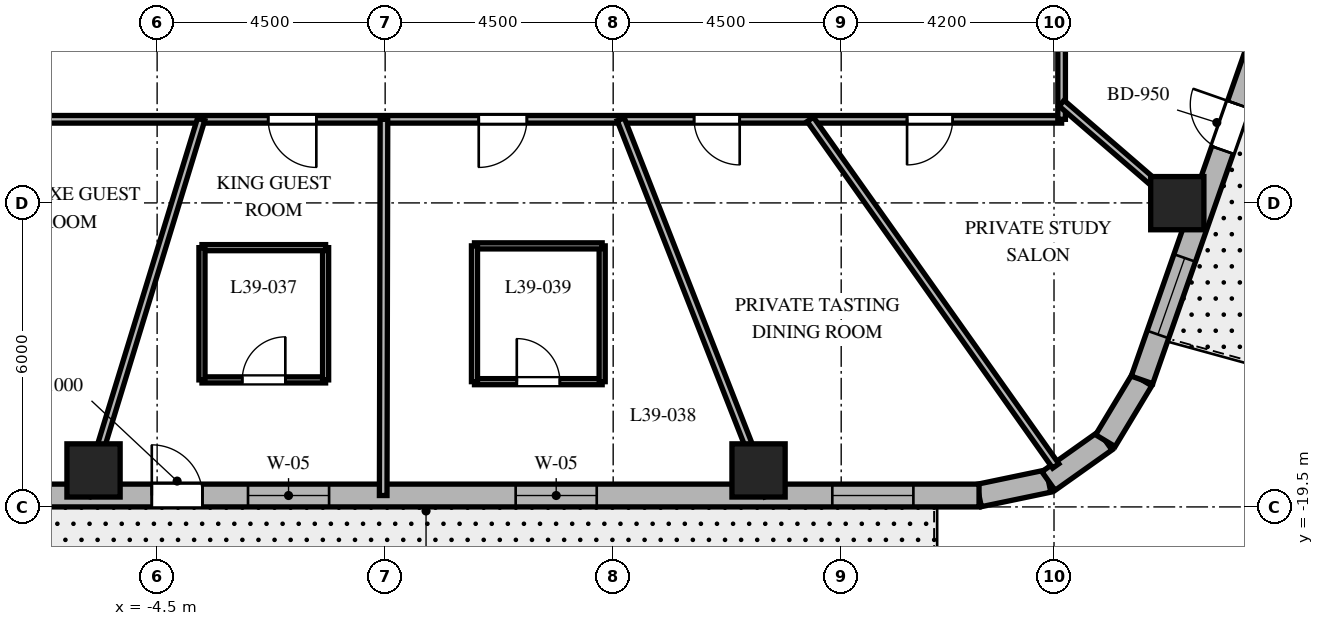
"""IFC4 building model, lengths in metres.
Left out: names, types, materials, properties, quantities, classifications, styles, units other than length and angle.
Written with IfcOpenShell. Run it as: python <this file> out.ifc"""

import sys

from ifc_helpers import new_model, si_unit, direction, frame, frame_2d, origin, origin_2d, place, context, subcontext, project, spatial, rectangle, extrude, element, fill, save


model = new_model("IFC4")
c1 = context("Model", 3, precision=1e-05, world=origin(), true_north=direction((0.0, 1.0)))
c2 = subcontext(c1, "Body", "Model", "MODEL_VIEW")
j1 = project(units=[si_unit("LENGTHUNIT", "METRE"), si_unit("PLANEANGLEUNIT", "RADIAN")], contexts=[c1])
p1 = place(None, origin())
s1 = spatial("IfcSite", under=j1, at=p1, CompositionType="ELEMENT")
p2 = place(p1, origin())
s2 = spatial("IfcBuilding", under=s1, at=p2, CompositionType="ELEMENT")
p3 = place(p2, frame((0.0, 0.0, 159.1)))
s3 = spatial("IfcBuildingStorey", under=s2, at=p3, CompositionType="ELEMENT", Elevation=159.1)
for number, where, z_axis, x_axis in (
    (1, (-5.755, -18.78, 0.0), (0.0, 0.0, 1.0), (1.0, 0.0, 0.0)),
    (2, (7.369, -18.78, 0.0), (0.0, 0.0, 1.0), (1.0, 0.0, 0.0)),
    (3, (15.633, -13.505, 0.0), (0.0, 0.0, 1.0), (1.0, 0.0, 0.0)),
):
    element("IfcColumn", number, at=place(p3, frame(where, z_axis=z_axis, x_axis=x_axis)), inside=s3, PredefinedType="COLUMN", context=c2, shape_type="SweptSolid", body=[
        extrude(rectangle(XDim=1.05, YDim=1.05, at=origin_2d()), origin(), (0.0, 0.0, 1.0), 3.7),
    ])
p4 = place(p3, frame((11.72, -19.275, 0.0), z_axis=(0.0, 0.0, 1.0), x_axis=(0.97893106758, 0.204191001093, 0.0)))
e4 = element("IfcWall", 4, at=p4, inside=s3, PredefinedType="SOLIDWALL", context=c2, shape_type="SweptSolid", body=[
    extrude(rectangle(XDim=1.4, YDim=0.45, at=frame_2d((0.7, 0.0))), origin(), (0.0, 0.0, 1.0), 3.4),
])
p5 = place(p3, frame((13.091, -18.989, 0.0), z_axis=(0.0, 0.0, 1.0), x_axis=(0.815574637848, 0.578651890258, 0.0)))
e5 = element("IfcWall", 5, at=p5, inside=s3, PredefinedType="SOLIDWALL", context=c2, shape_type="SweptSolid", body=[
    extrude(rectangle(XDim=1.377, YDim=0.45, at=frame_2d((0.688, 0.0))), origin(), (0.0, 0.0, 1.0), 3.4),
])
p6 = place(p3, frame((14.214, -18.192, 0.0), z_axis=(0.0, 0.0, 1.0), x_axis=(0.516340945502, 0.856383108193, 0.0)))
e6 = element("IfcWall", 6, at=p6, inside=s3, PredefinedType="SOLIDWALL", context=c2, shape_type="SweptSolid", body=[
    extrude(rectangle(XDim=1.4, YDim=0.45, at=frame_2d((0.7, 0.0))), origin(), (0.0, 0.0, 1.0), 3.4),
])
p7 = place(p3, frame((-10.108, -19.275, 0.0), z_axis=(0.0, 0.0, 1.0), x_axis=(1.0, 0.0, 0.0)))
e7 = element("IfcWall", 7, at=p7, inside=s3, PredefinedType="SOLIDWALL", context=c2, shape_type="SweptSolid", body=[
    extrude(rectangle(XDim=21.829, YDim=0.45, at=frame_2d((10.915, 0.0))), origin(), (0.0, 0.0, 1.0), 3.4),
])
p8 = place(p7, frame((5.503, 0.0, 0.0)))
e8 = element("IfcOpeningElement", 8, at=p8, cuts=e7, PredefinedType="OPENING", context=c2, shape_type="SweptSolid", body=[
    extrude(rectangle(XDim=1.0, YDim=2.15, at=frame_2d((0.5, 1.075))), frame((0.0, 0.235, 0.0), z_axis=(0.0, -1.0, 0.0), x_axis=(1.0, 0.0, 0.0)), (0.0, 0.0, 1.0), 0.47),
])
p9 = place(p7, frame((1.297, 0.0, 0.8)))
e9 = element("IfcOpeningElement", 9, at=p9, cuts=e7, PredefinedType="OPENING", context=c2, shape_type="SweptSolid", body=[
    extrude(rectangle(XDim=1.6, YDim=1.75, at=frame_2d((0.8, 0.875))), frame((0.0, 0.235, 0.0), z_axis=(0.0, -1.0, 0.0), x_axis=(1.0, 0.0, 0.0)), (0.0, 0.0, 1.0), 0.47),
])
p10 = place(p7, frame((7.402, 0.0, 0.8)))
e10 = element("IfcOpeningElement", 10, at=p10, cuts=e7, PredefinedType="OPENING", context=c2, shape_type="SweptSolid", body=[
    extrude(rectangle(XDim=1.6, YDim=1.75, at=frame_2d((0.8, 0.875))), frame((0.0, 0.235, 0.0), z_axis=(0.0, -1.0, 0.0), x_axis=(1.0, 0.0, 0.0)), (0.0, 0.0, 1.0), 0.47),
])
p11 = place(p7, frame((12.684, 0.0, 0.8)))
e11 = element("IfcOpeningElement", 11, at=p11, cuts=e7, PredefinedType="OPENING", context=c2, shape_type="SweptSolid", body=[
    extrude(rectangle(XDim=1.6, YDim=1.75, at=frame_2d((0.8, 0.875))), frame((0.0, 0.235, 0.0), z_axis=(0.0, -1.0, 0.0), x_axis=(1.0, 0.0, 0.0)), (0.0, 0.0, 1.0), 0.47),
])
p12 = place(p7, frame((18.933, 0.0, 0.8)))
e12 = element("IfcOpeningElement", 12, at=p12, cuts=e7, PredefinedType="OPENING", context=c2, shape_type="SweptSolid", body=[
    extrude(rectangle(XDim=1.6, YDim=1.75, at=frame_2d((0.8, 0.875))), frame((0.0, 0.235, 0.0), z_axis=(0.0, -1.0, 0.0), x_axis=(1.0, 0.0, 0.0)), (0.0, 0.0, 1.0), 0.47),
])
p13 = place(p3, frame((14.937, -16.993, 0.0), z_axis=(0.0, 0.0, 1.0), x_axis=(0.330431575061, 0.943829949834, 0.0)))
e13 = element("IfcWall", 13, at=p13, inside=s3, PredefinedType="SOLIDWALL", context=c2, shape_type="SweptSolid", body=[
    extrude(rectangle(XDim=17.689, YDim=0.45, at=frame_2d((8.844, 0.0))), origin(), (0.0, 0.0, 1.0), 3.4),
])
p14 = place(p13, frame((4.807, 0.0, 0.0)))
e14 = element("IfcOpeningElement", 14, at=p14, cuts=e13, PredefinedType="OPENING", context=c2, shape_type="SweptSolid", body=[
    extrude(rectangle(XDim=0.95, YDim=2.15, at=frame_2d((0.475, 1.075))), frame((0.0, 0.235, 0.0), z_axis=(0.0, -1.0, 0.0), x_axis=(1.0, 0.0, 0.0)), (0.0, 0.0, 1.0), 0.47),
])
p15 = place(p13, frame((0.95, 0.0, 0.8)))
e15 = element("IfcOpeningElement", 15, at=p15, cuts=e13, PredefinedType="OPENING", context=c2, shape_type="SweptSolid", body=[
    extrude(rectangle(XDim=1.6, YDim=1.75, at=frame_2d((0.8, 0.875))), frame((0.0, 0.235, 0.0), z_axis=(0.0, -1.0, 0.0), x_axis=(1.0, 0.0, 0.0)), (0.0, 0.0, 1.0), 0.47),
])
p16 = place(p13, frame((7.99, 0.0, 0.8)))
e16 = element("IfcOpeningElement", 16, at=p16, cuts=e13, PredefinedType="OPENING", context=c2, shape_type="SweptSolid", body=[
    extrude(rectangle(XDim=1.6, YDim=1.75, at=frame_2d((0.8, 0.875))), frame((0.0, 0.235, 0.0), z_axis=(0.0, -1.0, 0.0), x_axis=(1.0, 0.0, 0.0)), (0.0, 0.0, 1.0), 0.47),
])
p17 = place(p13, frame((15.084, 0.0, 0.8)))
e17 = element("IfcOpeningElement", 17, at=p17, cuts=e13, PredefinedType="OPENING", context=c2, shape_type="SweptSolid", body=[
    extrude(rectangle(XDim=1.6, YDim=1.75, at=frame_2d((0.8, 0.875))), frame((0.0, 0.235, 0.0), z_axis=(0.0, -1.0, 0.0), x_axis=(1.0, 0.0, 0.0)), (0.0, 0.0, 1.0), 0.47),
])
p18 = place(p3, frame((13.35, -11.85, 0.0), z_axis=(0.0, 0.0, 1.0), x_axis=(-1.0, 0.0, 0.0)))
e18 = element("IfcWall", 18, at=p18, inside=s3, PredefinedType="PARTITIONING", context=c2, shape_type="SweptSolid", body=[
    extrude(rectangle(XDim=26.7, YDim=0.15, at=frame_2d((13.35, 0.0))), origin(), (0.0, 0.0, 1.0), 2.84),
])
p19 = place(p18, frame((20.682, 0.0, 0.0)))
e19 = element("IfcOpeningElement", 19, at=p19, cuts=e18, PredefinedType="OPENING", context=c2, shape_type="SweptSolid", body=[
    extrude(rectangle(XDim=0.95, YDim=2.03, at=frame_2d((0.475, 1.015))), frame((0.0, 0.085, 0.0), z_axis=(0.0, -1.0, 0.0), x_axis=(1.0, 0.0, 0.0)), (0.0, 0.0, 1.0), 0.17),
])
p20 = place(p18, frame((14.708, 0.0, 0.0)))
e20 = element("IfcOpeningElement", 20, at=p20, cuts=e18, PredefinedType="OPENING", context=c2, shape_type="SweptSolid", body=[
    extrude(rectangle(XDim=0.95, YDim=2.03, at=frame_2d((0.475, 1.015))), frame((0.0, 0.085, 0.0), z_axis=(0.0, -1.0, 0.0), x_axis=(1.0, 0.0, 0.0)), (0.0, 0.0, 1.0), 0.17),
])
p21 = place(p18, frame((10.553, 0.0, 0.0)))
e21 = element("IfcOpeningElement", 21, at=p21, cuts=e18, PredefinedType="OPENING", context=c2, shape_type="SweptSolid", body=[
    extrude(rectangle(XDim=0.95, YDim=2.03, at=frame_2d((0.475, 1.015))), frame((0.0, 0.085, 0.0), z_axis=(0.0, -1.0, 0.0), x_axis=(1.0, 0.0, 0.0)), (0.0, 0.0, 1.0), 0.17),
])
p22 = place(p18, frame((6.353, 0.0, 0.0)))
e22 = element("IfcOpeningElement", 22, at=p22, cuts=e18, PredefinedType="OPENING", context=c2, shape_type="SweptSolid", body=[
    extrude(rectangle(XDim=0.9, YDim=2.03, at=frame_2d((0.45, 1.015))), frame((0.0, 0.085, 0.0), z_axis=(0.0, -1.0, 0.0), x_axis=(1.0, 0.0, 0.0)), (0.0, 0.0, 1.0), 0.17),
])
p23 = place(p18, frame((2.15, 0.0, 0.0)))
e23 = element("IfcOpeningElement", 23, at=p23, cuts=e18, PredefinedType="OPENING", context=c2, shape_type="SweptSolid", body=[
    extrude(rectangle(XDim=0.9, YDim=2.03, at=frame_2d((0.45, 1.015))), frame((0.0, 0.085, 0.0), z_axis=(0.0, -1.0, 0.0), x_axis=(1.0, 0.0, 0.0)), (0.0, 0.0, 1.0), 0.17),
])
p24 = place(p3, frame((13.35, 11.85, 0.0), z_axis=(0.0, 0.0, 1.0), x_axis=(0.0, -1.0, 0.0)))
e24 = element("IfcWall", 24, at=p24, inside=s3, PredefinedType="PARTITIONING", context=c2, shape_type="SweptSolid", body=[
    extrude(rectangle(XDim=23.7, YDim=0.15, at=frame_2d((11.85, 0.0))), origin(), (0.0, 0.0, 1.0), 2.84),
])
p25 = place(p24, frame((5.652, 0.0, 0.0)))
e25 = element("IfcOpeningElement", 25, at=p25, cuts=e24, PredefinedType="OPENING", context=c2, shape_type="SweptSolid", body=[
    extrude(rectangle(XDim=0.95, YDim=2.03, at=frame_2d((0.475, 1.015))), frame((0.0, 0.085, 0.0), z_axis=(0.0, -1.0, 0.0), x_axis=(1.0, 0.0, 0.0)), (0.0, 0.0, 1.0), 0.17),
])
p26 = place(p24, frame((1.721, 0.0, 0.0)))
e26 = element("IfcOpeningElement", 26, at=p26, cuts=e24, PredefinedType="OPENING", context=c2, shape_type="SweptSolid", body=[
    extrude(rectangle(XDim=0.9, YDim=2.03, at=frame_2d((0.45, 1.015))), frame((0.0, 0.085, 0.0), z_axis=(0.0, -1.0, 0.0), x_axis=(1.0, 0.0, 0.0)), (0.0, 0.0, 1.0), 0.17),
])
p27 = place(p24, frame((18.389, 0.0, 0.0)))
e27 = element("IfcOpeningElement", 27, at=p27, cuts=e24, PredefinedType="OPENING", context=c2, shape_type="SweptSolid", body=[
    extrude(rectangle(XDim=0.95, YDim=2.03, at=frame_2d((0.475, 1.015))), frame((0.0, 0.085, 0.0), z_axis=(0.0, -1.0, 0.0), x_axis=(1.0, 0.0, 0.0)), (0.0, 0.0, 1.0), 0.17),
])
p28 = place(p24, frame((10.751, 0.0, 0.0)))
e28 = element("IfcOpeningElement", 28, at=p28, cuts=e24, PredefinedType="OPENING", context=c2, shape_type="SweptSolid", body=[
    extrude(rectangle(XDim=0.95, YDim=2.03, at=frame_2d((0.475, 1.015))), frame((0.0, 0.085, 0.0), z_axis=(0.0, -1.0, 0.0), x_axis=(1.0, 0.0, 0.0)), (0.0, 0.0, 1.0), 0.17),
])
p29 = place(p3, frame((-3.631, -11.85, 0.0), z_axis=(0.0, 0.0, 1.0), x_axis=(-0.293007573338, -0.956110120209, 0.0)))
e29 = element("IfcWall", 29, at=p29, inside=s3, PredefinedType="PARTITIONING", context=c2, shape_type="SweptSolid", body=[
    extrude(rectangle(XDim=7.766, YDim=0.15, at=frame_2d((3.883, 0.0))), origin(), (0.0, 0.0, 1.0), 2.64),
])
p30 = place(p3, frame((-0.024, -11.85, 0.0), z_axis=(0.0, 0.0, 1.0), x_axis=(-0.001972901592, -0.999998053828, 0.0)))
e30 = element("IfcWall", 30, at=p30, inside=s3, PredefinedType="PARTITIONING", context=c2, shape_type="SweptSolid", body=[
    extrude(rectangle(XDim=7.425, YDim=0.15, at=frame_2d((3.712, 0.0))), origin(), (0.0, 0.0, 1.0), 2.64),
])
p31 = place(p3, frame((4.65, -11.85, 0.0), z_axis=(0.0, 0.0, 1.0), x_axis=(0.365265947993, -0.930903210456, 0.0)))
e31 = element("IfcWall", 31, at=p31, inside=s3, PredefinedType="PARTITIONING", context=c2, shape_type="SweptSolid", body=[
    extrude(rectangle(XDim=7.976, YDim=0.15, at=frame_2d((3.988, 0.0))), origin(), (0.0, 0.0, 1.0), 2.64),
])
p32 = place(p3, frame((8.39, -11.85, 0.0), z_axis=(0.0, 0.0, 1.0), x_axis=(0.577877530264, -0.816123495566, 0.0)))
e32 = element("IfcWall", 32, at=p32, inside=s3, PredefinedType="PARTITIONING", context=c2, shape_type="SweptSolid", body=[
    extrude(rectangle(XDim=8.382, YDim=0.15, at=frame_2d((4.191, 0.0))), origin(), (0.0, 0.0, 1.0), 2.64),
])
p33 = place(p3, frame((13.35, -11.533, 0.0), z_axis=(0.0, 0.0, 1.0), x_axis=(0.756711647314, -0.65374879183, 0.0)))
e33 = element("IfcWall", 33, at=p33, inside=s3, PredefinedType="PARTITIONING", context=c2, shape_type="SweptSolid", body=[
    extrude(rectangle(XDim=3.55, YDim=0.15, at=frame_2d((1.775, 0.0))), origin(), (0.0, 0.0, 1.0), 2.64),
])
p34 = place(p3, frame((-3.615, -16.993, 0.0), z_axis=(0.0, 0.0, 1.0), x_axis=(1.0, 0.0, 0.0)))
e34 = element("IfcWall", 34, at=p34, inside=s3, PredefinedType="PARTITIONING", context=c2, shape_type="SweptSolid", body=[
    extrude(rectangle(XDim=2.44, YDim=0.12, at=frame_2d((1.22, 0.0))), origin(), (0.0, 0.0, 1.0), 3.4),
])
p35 = place(p34, frame((0.795, 0.0, 0.0)))
e35 = element("IfcOpeningElement", 35, at=p35, cuts=e34, PredefinedType="OPENING", context=c2, shape_type="SweptSolid", body=[
    extrude(rectangle(XDim=0.85, YDim=2.03, at=frame_2d((0.425, 1.015))), frame((0.0, 0.07, 0.0), z_axis=(0.0, -1.0, 0.0), x_axis=(1.0, 0.0, 0.0)), (0.0, 0.0, 1.0), 0.14),
])
p36 = place(p3, frame((-1.175, -16.993, 0.0), z_axis=(0.0, 0.0, 1.0), x_axis=(0.0, 1.0, 0.0)))
e36 = element("IfcWall", 36, at=p36, inside=s3, PredefinedType="PARTITIONING", context=c2, shape_type="SweptSolid", body=[
    extrude(rectangle(XDim=2.61, YDim=0.12, at=frame_2d((1.305, 0.0))), origin(), (0.0, 0.0, 1.0), 2.84),
])
p37 = place(p3, frame((-1.175, -14.383, 0.0), z_axis=(0.0, 0.0, 1.0), x_axis=(-1.0, 0.0, 0.0)))
e37 = element("IfcWall", 37, at=p37, inside=s3, PredefinedType="PARTITIONING", context=c2, shape_type="SweptSolid", body=[
    extrude(rectangle(XDim=2.44, YDim=0.12, at=frame_2d((1.22, 0.0))), origin(), (0.0, 0.0, 1.0), 3.4),
])
p38 = place(p3, frame((-3.615, -14.383, 0.0), z_axis=(0.0, 0.0, 1.0), x_axis=(0.0, -1.0, 0.0)))
e38 = element("IfcWall", 38, at=p38, inside=s3, PredefinedType="PARTITIONING", context=c2, shape_type="SweptSolid", body=[
    extrude(rectangle(XDim=2.61, YDim=0.12, at=frame_2d((1.305, 0.0))), origin(), (0.0, 0.0, 1.0), 2.84),
])
p39 = place(p3, frame((1.763, -17.028, 0.0), z_axis=(0.0, 0.0, 1.0), x_axis=(1.0, 0.0, 0.0)))
e39 = element("IfcWall", 39, at=p39, inside=s3, PredefinedType="PARTITIONING", context=c2, shape_type="SweptSolid", body=[
    extrude(rectangle(XDim=2.52, YDim=0.12, at=frame_2d((1.26, 0.0))), origin(), (0.0, 0.0, 1.0), 3.4),
])
p40 = place(p39, frame((0.835, 0.0, 0.0)))
e40 = element("IfcOpeningElement", 40, at=p40, cuts=e39, PredefinedType="OPENING", context=c2, shape_type="SweptSolid", body=[
    extrude(rectangle(XDim=0.85, YDim=2.03, at=frame_2d((0.425, 1.015))), frame((0.0, 0.07, 0.0), z_axis=(0.0, -1.0, 0.0), x_axis=(1.0, 0.0, 0.0)), (0.0, 0.0, 1.0), 0.14),
])
p41 = place(p3, frame((4.283, -17.028, 0.0), z_axis=(0.0, 0.0, 1.0), x_axis=(0.0, 1.0, 0.0)))
e41 = element("IfcWall", 41, at=p41, inside=s3, PredefinedType="PARTITIONING", context=c2, shape_type="SweptSolid", body=[
    extrude(rectangle(XDim=2.68, YDim=0.12, at=frame_2d((1.34, 0.0))), origin(), (0.0, 0.0, 1.0), 2.84),
])
p42 = place(p3, frame((4.283, -14.348, 0.0), z_axis=(0.0, 0.0, 1.0), x_axis=(-1.0, 0.0, 0.0)))
e42 = element("IfcWall", 42, at=p42, inside=s3, PredefinedType="PARTITIONING", context=c2, shape_type="SweptSolid", body=[
    extrude(rectangle(XDim=2.52, YDim=0.12, at=frame_2d((1.26, 0.0))), origin(), (0.0, 0.0, 1.0), 3.4),
])
p43 = place(p3, frame((1.763, -14.348, 0.0), z_axis=(0.0, 0.0, 1.0), x_axis=(0.0, -1.0, 0.0)))
e43 = element("IfcWall", 43, at=p43, inside=s3, PredefinedType="PARTITIONING", context=c2, shape_type="SweptSolid", body=[
    extrude(rectangle(XDim=2.68, YDim=0.12, at=frame_2d((1.34, 0.0))), origin(), (0.0, 0.0, 1.0), 2.84),
])
p44 = place(p8, origin())
e44 = element("IfcDoor", 44, at=p44, inside=s3, OperationType="SINGLE_SWING_LEFT", PredefinedType="DOOR", context=c2, shape_type="SweptSolid", body=[
    extrude(rectangle(XDim=1.0, YDim=2.15, at=frame_2d((0.5, 1.075))), frame((0.0, 0.025, 0.0), z_axis=(0.0, -1.0, 0.0), x_axis=(1.0, 0.0, 0.0)), (0.0, 0.0, 1.0), 0.05),
])
fill(e8, e44)
p45 = place(p10, origin())
e45 = element("IfcWindow", 45, at=p45, inside=s3, PartitioningType="SINGLE_PANEL", PredefinedType="WINDOW", context=c2, shape_type="SweptSolid", body=[
    extrude(rectangle(XDim=1.6, YDim=1.75, at=frame_2d((0.8, 0.875))), frame((0.0, 0.03, 0.0), z_axis=(0.0, -1.0, 0.0), x_axis=(1.0, 0.0, 0.0)), (0.0, 0.0, 1.0), 0.06),
])
fill(e10, e45)
p46 = place(p11, origin())
e46 = element("IfcWindow", 46, at=p46, inside=s3, PartitioningType="SINGLE_PANEL", PredefinedType="WINDOW", context=c2, shape_type="SweptSolid", body=[
    extrude(rectangle(XDim=1.6, YDim=1.75, at=frame_2d((0.8, 0.875))), frame((0.0, 0.03, 0.0), z_axis=(0.0, -1.0, 0.0), x_axis=(1.0, 0.0, 0.0)), (0.0, 0.0, 1.0), 0.06),
])
fill(e11, e46)
p47 = place(p12, origin())
e47 = element("IfcWindow", 47, at=p47, inside=s3, PartitioningType="SINGLE_PANEL", PredefinedType="WINDOW", context=c2, shape_type="SweptSolid", body=[
    extrude(rectangle(XDim=1.6, YDim=1.75, at=frame_2d((0.8, 0.875))), frame((0.0, 0.03, 0.0), z_axis=(0.0, -1.0, 0.0), x_axis=(1.0, 0.0, 0.0)), (0.0, 0.0, 1.0), 0.06),
])
fill(e12, e47)
p48 = place(p14, origin())
e48 = element("IfcDoor", 48, at=p48, inside=s3, OperationType="SINGLE_SWING_RIGHT", PredefinedType="DOOR", context=c2, shape_type="SweptSolid", body=[
    extrude(rectangle(XDim=0.95, YDim=2.15, at=frame_2d((0.475, 1.075))), frame((0.0, 0.025, 0.0), z_axis=(0.0, -1.0, 0.0), x_axis=(1.0, 0.0, 0.0)), (0.0, 0.0, 1.0), 0.05),
])
fill(e14, e48)
p49 = place(p15, origin())
e49 = element("IfcWindow", 49, at=p49, inside=s3, PartitioningType="SINGLE_PANEL", PredefinedType="WINDOW", context=c2, shape_type="SweptSolid", body=[
    extrude(rectangle(XDim=1.6, YDim=1.75, at=frame_2d((0.8, 0.875))), frame((0.0, 0.03, 0.0), z_axis=(0.0, -1.0, 0.0), x_axis=(1.0, 0.0, 0.0)), (0.0, 0.0, 1.0), 0.06),
])
fill(e15, e49)
p50 = place(p20, origin())
e50 = element("IfcDoor", 50, at=p50, inside=s3, OperationType="SINGLE_SWING_LEFT", PredefinedType="DOOR", context=c2, shape_type="SweptSolid", body=[
    extrude(rectangle(XDim=0.95, YDim=2.03, at=frame_2d((0.475, 1.015))), frame((0.0, 0.025, 0.0), z_axis=(0.0, -1.0, 0.0), x_axis=(1.0, 0.0, 0.0)), (0.0, 0.0, 1.0), 0.05),
])
fill(e20, e50)
p51 = place(p35, origin())
e51 = element("IfcDoor", 51, at=p51, inside=s3, OperationType="SINGLE_SWING_RIGHT", PredefinedType="DOOR", context=c2, shape_type="SweptSolid", body=[
    extrude(rectangle(XDim=0.85, YDim=2.03, at=frame_2d((0.425, 1.015))), frame((0.0, 0.025, 0.0), z_axis=(0.0, -1.0, 0.0), x_axis=(1.0, 0.0, 0.0)), (0.0, 0.0, 1.0), 0.05),
])
fill(e35, e51)
p52 = place(p21, origin())
e52 = element("IfcDoor", 52, at=p52, inside=s3, OperationType="SINGLE_SWING_RIGHT", PredefinedType="DOOR", context=c2, shape_type="SweptSolid", body=[
    extrude(rectangle(XDim=0.95, YDim=2.03, at=frame_2d((0.475, 1.015))), frame((0.0, 0.025, 0.0), z_axis=(0.0, -1.0, 0.0), x_axis=(1.0, 0.0, 0.0)), (0.0, 0.0, 1.0), 0.05),
])
fill(e21, e52)
p53 = place(p40, origin())
e53 = element("IfcDoor", 53, at=p53, inside=s3, OperationType="SINGLE_SWING_LEFT", PredefinedType="DOOR", context=c2, shape_type="SweptSolid", body=[
    extrude(rectangle(XDim=0.85, YDim=2.03, at=frame_2d((0.425, 1.015))), frame((0.0, 0.025, 0.0), z_axis=(0.0, -1.0, 0.0), x_axis=(1.0, 0.0, 0.0)), (0.0, 0.0, 1.0), 0.05),
])
fill(e40, e53)
p54 = place(p22, origin())
e54 = element("IfcDoor", 54, at=p54, inside=s3, OperationType="SINGLE_SWING_LEFT", PredefinedType="DOOR", context=c2, shape_type="SweptSolid", body=[
    extrude(rectangle(XDim=0.9, YDim=2.03, at=frame_2d((0.45, 1.015))), frame((0.0, 0.025, 0.0), z_axis=(0.0, -1.0, 0.0), x_axis=(1.0, 0.0, 0.0)), (0.0, 0.0, 1.0), 0.05),
])
fill(e22, e54)
p55 = place(p23, origin())
e55 = element("IfcDoor", 55, at=p55, inside=s3, OperationType="SINGLE_SWING_RIGHT", PredefinedType="DOOR", context=c2, shape_type="SweptSolid", body=[
    extrude(rectangle(XDim=0.9, YDim=2.03, at=frame_2d((0.45, 1.015))), frame((0.0, 0.025, 0.0), z_axis=(0.0, -1.0, 0.0), x_axis=(1.0, 0.0, 0.0)), (0.0, 0.0, 1.0), 0.05),
])
fill(e23, e55)
save(model, sys.argv[1])
